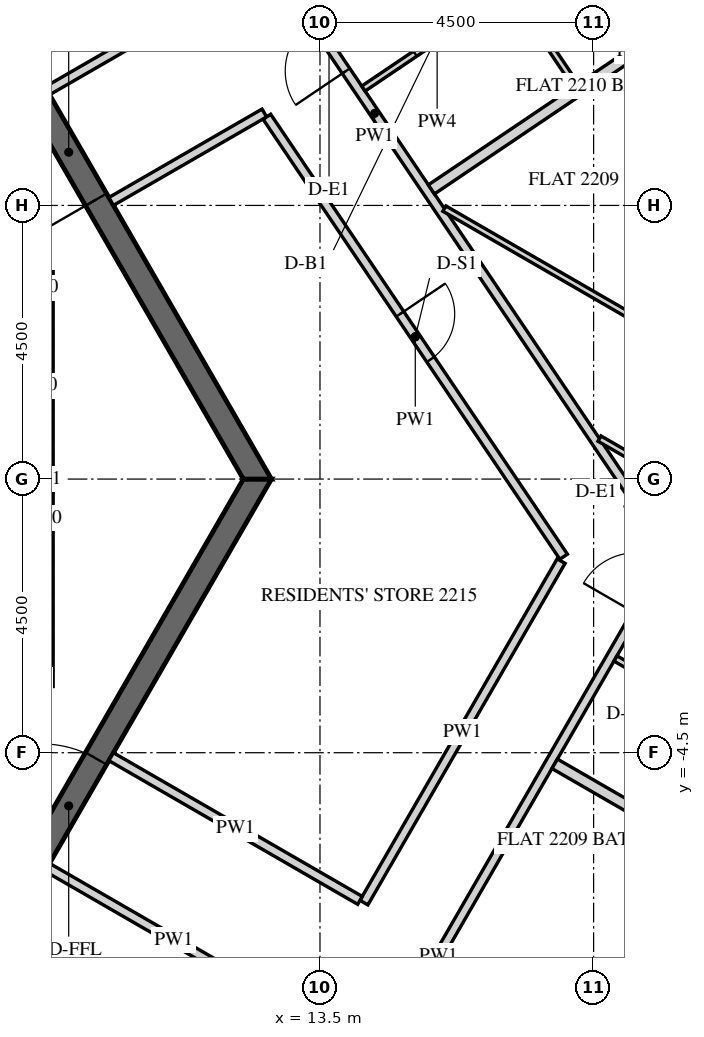
"""IFC4 building model, lengths in metres.
Left out: names, types, materials, properties, quantities, classifications, styles, units other than length and angle.
Written with IfcOpenShell. Run it as: python <this file> out.ifc"""

import sys

from ifc_helpers import new_model, si_unit, direction, frame, frame_2d, origin, place, context, subcontext, project, spatial, polyline, rectangle, outline, extrude, element, fill, save


model = new_model("IFC4")
c1 = context("Model", 3, precision=1e-05, world=origin(), true_north=direction((0.0, 1.0)))
c2 = subcontext(c1, "Body", "Model", "MODEL_VIEW")
j1 = project(units=[si_unit("LENGTHUNIT", "METRE"), si_unit("PLANEANGLEUNIT", "RADIAN")], contexts=[c1])
p1 = place(None, origin())
s1 = spatial("IfcSite", under=j1, at=p1, CompositionType="ELEMENT")
p2 = place(p1, origin())
s2 = spatial("IfcBuilding", under=s1, at=p2, CompositionType="ELEMENT")
p3 = place(p2, frame((0.0, 0.0, 279.6)))
s3 = spatial("IfcBuildingStorey", under=s2, at=p3, CompositionType="ELEMENT", Elevation=279.6)
p4 = place(p3, frame((16.451, -23.005, -0.15), z_axis=(0.0, 0.0, 1.0), x_axis=(0.500003737743, 0.866023245787, 0.0)))
e1 = element("IfcWall", 1, at=p4, inside=s3, PredefinedType="SOLIDWALL", context=c2, shape_type="SweptSolid", body=[
    extrude(outline(polyline([(-0.021, -0.25), (25.468, -0.25), (25.421, 0.25), (0.021, 0.25), (-0.021, -0.25)])), origin(), (0.0, 0.0, 1.0), 3.9),
])
p5 = place(p4, frame((2.522, 0.0, 0.75)))
e2 = element("IfcOpeningElement", 2, at=p5, cuts=e1, PredefinedType="OPENING", context=c2, shape_type="SweptSolid", body=[
    extrude(rectangle(XDim=2.4, YDim=2.7, at=frame_2d((1.2, 1.35))), frame((0.0, 0.26, 0.0), z_axis=(0.0, -1.0, 0.0), x_axis=(1.0, 0.0, 0.0)), (0.0, 0.0, 1.0), 0.52),
])
p6 = place(p4, frame((6.122, 0.0, 0.75)))
e3 = element("IfcOpeningElement", 3, at=p6, cuts=e1, PredefinedType="OPENING", context=c2, shape_type="SweptSolid", body=[
    extrude(rectangle(XDim=2.4, YDim=2.7, at=frame_2d((1.2, 1.35))), frame((0.0, 0.26, 0.0), z_axis=(0.0, -1.0, 0.0), x_axis=(1.0, 0.0, 0.0)), (0.0, 0.0, 1.0), 0.52),
])
p7 = place(p4, frame((9.722, 0.0, 0.75)))
e4 = element("IfcOpeningElement", 4, at=p7, cuts=e1, PredefinedType="OPENING", context=c2, shape_type="SweptSolid", body=[
    extrude(rectangle(XDim=2.4, YDim=2.7, at=frame_2d((1.2, 1.35))), frame((0.0, 0.26, 0.0), z_axis=(0.0, -1.0, 0.0), x_axis=(1.0, 0.0, 0.0)), (0.0, 0.0, 1.0), 0.52),
])
p8 = place(p4, frame((13.323, 0.0, 0.75)))
e5 = element("IfcOpeningElement", 5, at=p8, cuts=e1, PredefinedType="OPENING", context=c2, shape_type="SweptSolid", body=[
    extrude(rectangle(XDim=2.4, YDim=2.7, at=frame_2d((1.2, 1.35))), frame((0.0, 0.26, 0.0), z_axis=(0.0, -1.0, 0.0), x_axis=(1.0, 0.0, 0.0)), (0.0, 0.0, 1.0), 0.52),
])
p9 = place(p4, frame((16.922, 0.0, 0.75)))
e6 = element("IfcOpeningElement", 6, at=p9, cuts=e1, PredefinedType="OPENING", context=c2, shape_type="SweptSolid", body=[
    extrude(rectangle(XDim=2.4, YDim=2.7, at=frame_2d((1.2, 1.35))), frame((0.0, 0.26, 0.0), z_axis=(0.0, -1.0, 0.0), x_axis=(1.0, 0.0, 0.0)), (0.0, 0.0, 1.0), 0.52),
])
p10 = place(p4, frame((20.522, 0.0, 0.75)))
e7 = element("IfcOpeningElement", 7, at=p10, cuts=e1, PredefinedType="OPENING", context=c2, shape_type="SweptSolid", body=[
    extrude(rectangle(XDim=2.4, YDim=2.7, at=frame_2d((1.2, 1.35))), frame((0.0, 0.26, 0.0), z_axis=(0.0, -1.0, 0.0), x_axis=(1.0, 0.0, 0.0)), (0.0, 0.0, 1.0), 0.52),
])
p11 = place(p3, frame((26.706, 2.879, -0.15), z_axis=(0.0, 0.0, 1.0), x_axis=(-0.559197891507, 0.829034208061, 0.0)))
e8 = element("IfcWall", 8, at=p11, inside=s3, PredefinedType="SOLIDWALL", context=c2, shape_type="SweptSolid", body=[
    extrude(outline(polyline([(0.25, -0.25), (22.795, -0.25), (23.295, 0.25), (-0.25, 0.25), (0.25, -0.25)])), origin(), (0.0, 0.0, 1.0), 3.9),
])
p12 = place(p11, frame((1.323, 0.0, 1.05)))
e9 = element("IfcOpeningElement", 9, at=p12, cuts=e8, PredefinedType="OPENING", context=c2, shape_type="SweptSolid", body=[
    extrude(rectangle(XDim=0.9, YDim=1.5, at=frame_2d((0.45, 0.75))), frame((0.0, 0.26, 0.0), z_axis=(0.0, -1.0, 0.0), x_axis=(1.0, 0.0, 0.0)), (0.0, 0.0, 1.0), 0.52),
])
p13 = place(p11, frame((2.522, 0.0, 0.15)))
e10 = element("IfcOpeningElement", 10, at=p13, cuts=e8, PredefinedType="OPENING", context=c2, shape_type="SweptSolid", body=[
    extrude(rectangle(XDim=1.2, YDim=2.4, at=frame_2d((0.6, 1.2))), frame((0.0, 0.26, 0.0), z_axis=(0.0, -1.0, 0.0), x_axis=(1.0, 0.0, 0.0)), (0.0, 0.0, 1.0), 0.52),
])
p14 = place(p11, frame((4.922, 0.0, 1.05)))
e11 = element("IfcOpeningElement", 11, at=p14, cuts=e8, PredefinedType="OPENING", context=c2, shape_type="SweptSolid", body=[
    extrude(rectangle(XDim=0.9, YDim=1.5, at=frame_2d((0.45, 0.75))), frame((0.0, 0.26, 0.0), z_axis=(0.0, -1.0, 0.0), x_axis=(1.0, 0.0, 0.0)), (0.0, 0.0, 1.0), 0.52),
])
p15 = place(p11, frame((6.122, 0.0, 0.15)))
e12 = element("IfcOpeningElement", 12, at=p15, cuts=e8, PredefinedType="OPENING", context=c2, shape_type="SweptSolid", body=[
    extrude(rectangle(XDim=1.2, YDim=2.4, at=frame_2d((0.6, 1.2))), frame((0.0, 0.26, 0.0), z_axis=(0.0, -1.0, 0.0), x_axis=(1.0, 0.0, 0.0)), (0.0, 0.0, 1.0), 0.52),
])
p16 = place(p11, frame((8.522, 0.0, 1.05)))
e13 = element("IfcOpeningElement", 13, at=p16, cuts=e8, PredefinedType="OPENING", context=c2, shape_type="SweptSolid", body=[
    extrude(rectangle(XDim=0.9, YDim=1.5, at=frame_2d((0.45, 0.75))), frame((0.0, 0.26, 0.0), z_axis=(0.0, -1.0, 0.0), x_axis=(1.0, 0.0, 0.0)), (0.0, 0.0, 1.0), 0.52),
])
p17 = place(p11, frame((9.722, 0.0, 0.15)))
e14 = element("IfcOpeningElement", 14, at=p17, cuts=e8, PredefinedType="OPENING", context=c2, shape_type="SweptSolid", body=[
    extrude(rectangle(XDim=1.2, YDim=2.4, at=frame_2d((0.6, 1.2))), frame((0.0, 0.26, 0.0), z_axis=(0.0, -1.0, 0.0), x_axis=(1.0, 0.0, 0.0)), (0.0, 0.0, 1.0), 0.52),
])
p18 = place(p11, frame((12.122, 0.0, 1.05)))
e15 = element("IfcOpeningElement", 15, at=p18, cuts=e8, PredefinedType="OPENING", context=c2, shape_type="SweptSolid", body=[
    extrude(rectangle(XDim=0.9, YDim=1.5, at=frame_2d((0.45, 0.75))), frame((0.0, 0.26, 0.0), z_axis=(0.0, -1.0, 0.0), x_axis=(1.0, 0.0, 0.0)), (0.0, 0.0, 1.0), 0.52),
])
p19 = place(p11, frame((13.323, 0.0, 0.15)))
e16 = element("IfcOpeningElement", 16, at=p19, cuts=e8, PredefinedType="OPENING", context=c2, shape_type="SweptSolid", body=[
    extrude(rectangle(XDim=1.2, YDim=2.4, at=frame_2d((0.6, 1.2))), frame((0.0, 0.26, 0.0), z_axis=(0.0, -1.0, 0.0), x_axis=(1.0, 0.0, 0.0)), (0.0, 0.0, 1.0), 0.52),
])
p20 = place(p11, frame((15.722, 0.0, 1.05)))
e17 = element("IfcOpeningElement", 17, at=p20, cuts=e8, PredefinedType="OPENING", context=c2, shape_type="SweptSolid", body=[
    extrude(rectangle(XDim=0.9, YDim=1.5, at=frame_2d((0.45, 0.75))), frame((0.0, 0.26, 0.0), z_axis=(0.0, -1.0, 0.0), x_axis=(1.0, 0.0, 0.0)), (0.0, 0.0, 1.0), 0.52),
])
p21 = place(p11, frame((16.922, 0.0, 0.15)))
e18 = element("IfcOpeningElement", 18, at=p21, cuts=e8, PredefinedType="OPENING", context=c2, shape_type="SweptSolid", body=[
    extrude(rectangle(XDim=1.2, YDim=2.4, at=frame_2d((0.6, 1.2))), frame((0.0, 0.26, 0.0), z_axis=(0.0, -1.0, 0.0), x_axis=(1.0, 0.0, 0.0)), (0.0, 0.0, 1.0), 0.52),
])
p22 = place(p11, frame((19.323, 0.0, 1.05)))
e19 = element("IfcOpeningElement", 19, at=p22, cuts=e8, PredefinedType="OPENING", context=c2, shape_type="SweptSolid", body=[
    extrude(rectangle(XDim=0.9, YDim=1.5, at=frame_2d((0.45, 0.75))), frame((0.0, 0.26, 0.0), z_axis=(0.0, -1.0, 0.0), x_axis=(1.0, 0.0, 0.0)), (0.0, 0.0, 1.0), 0.52),
])
p23 = place(p11, frame((20.522, 0.0, 0.15)))
e20 = element("IfcOpeningElement", 20, at=p23, cuts=e8, PredefinedType="OPENING", context=c2, shape_type="SweptSolid", body=[
    extrude(rectangle(XDim=1.2, YDim=2.4, at=frame_2d((0.6, 1.2))), frame((0.0, 0.26, 0.0), z_axis=(0.0, -1.0, 0.0), x_axis=(1.0, 0.0, 0.0)), (0.0, 0.0, 1.0), 0.52),
])
p24 = place(p3, frame((6.235, -10.8, -0.15), z_axis=(0.0, 0.0, 1.0), x_axis=(0.499996419489, 0.866027470984, 0.0)))
e21 = element("IfcWall", 21, at=p24, inside=s3, PredefinedType="SHEAR", context=c2, shape_type="SweptSolid", body=[
    extrude(outline(polyline([(-0.115, -0.2), (12.586, -0.2), (12.355, 0.2), (0.115, 0.2), (-0.115, -0.2)])), origin(), (0.0, 0.0, 1.0), 3.9),
])
p25 = place(p24, frame((5.364, 0.0, 0.15)))
e22 = element("IfcOpeningElement", 22, at=p25, cuts=e21, PredefinedType="OPENING", context=c2, shape_type="SweptSolid", body=[
    extrude(rectangle(XDim=1.8, YDim=2.4, at=frame_2d((0.9, 1.2))), frame((0.0, 0.21, 0.0), z_axis=(0.0, -1.0, 0.0), x_axis=(1.0, 0.0, 0.0)), (0.0, 0.0, 1.0), 0.42),
])
p26 = place(p3, frame((12.471, 0.0, -0.15), z_axis=(0.0, 0.0, 1.0), x_axis=(-0.499996419489, 0.866027470984, 0.0)))
e23 = element("IfcWall", 23, at=p26, inside=s3, PredefinedType="SHEAR", context=c2, shape_type="SweptSolid", body=[
    extrude(outline(polyline([(-0.115, -0.2), (12.586, -0.2), (12.355, 0.2), (0.115, 0.2), (-0.115, -0.2)])), origin(), (0.0, 0.0, 1.0), 3.9),
])
p27 = place(p26, frame((5.306, 0.0, 0.15)))
e24 = element("IfcOpeningElement", 24, at=p27, cuts=e23, PredefinedType="OPENING", context=c2, shape_type="SweptSolid", body=[
    extrude(rectangle(XDim=1.8, YDim=2.4, at=frame_2d((0.9, 1.2))), frame((0.0, 0.21, 0.0), z_axis=(0.0, -1.0, 0.0), x_axis=(1.0, 0.0, 0.0)), (0.0, 0.0, 1.0), 0.42),
])
p28 = place(p3, frame((11.627, -14.462, 0.0), z_axis=(0.0, 0.0, 1.0), x_axis=(0.499994634027, 0.866028501808, 0.0)))
e25 = element("IfcWall", 25, at=p28, inside=s3, PredefinedType="PARTITIONING", context=c2, shape_type="SweptSolid", body=[
    extrude(rectangle(XDim=15.296, YDim=0.15, at=frame_2d((7.648, 0.0))), origin(), (0.0, 0.0, 1.0), 2.988),
])
p29 = place(p28, frame((0.525, 0.0, 0.0)))
e26 = element("IfcOpeningElement", 26, at=p29, cuts=e25, PredefinedType="OPENING", context=c2, shape_type="SweptSolid", body=[
    extrude(rectangle(XDim=1.0, YDim=2.1, at=frame_2d((0.5, 1.05))), frame((0.0, 0.085, 0.0), z_axis=(0.0, -1.0, 0.0), x_axis=(1.0, 0.0, 0.0)), (0.0, 0.0, 1.0), 0.17),
])
p30 = place(p28, frame((14.146, 0.0, 0.0)))
e27 = element("IfcOpeningElement", 27, at=p30, cuts=e25, PredefinedType="OPENING", context=c2, shape_type="SweptSolid", body=[
    extrude(rectangle(XDim=1.0, YDim=2.1, at=frame_2d((0.5, 1.05))), frame((0.0, 0.085, 0.0), z_axis=(0.0, -1.0, 0.0), x_axis=(1.0, 0.0, 0.0)), (0.0, 0.0, 1.0), 0.17),
])
p31 = place(p3, frame((19.228, -1.146, 0.0), z_axis=(0.0, 0.0, 1.0), x_axis=(-0.559173750718, 0.829050490928, 0.0)))
e28 = element("IfcWall", 28, at=p31, inside=s3, PredefinedType="PARTITIONING", context=c2, shape_type="SweptSolid", body=[
    extrude(rectangle(XDim=17.273, YDim=0.15, at=frame_2d((8.637, 0.0))), origin(), (0.0, 0.0, 1.0), 2.988),
])
p32 = place(p31, frame((9.478, 0.0, 0.0)))
e29 = element("IfcOpeningElement", 29, at=p32, cuts=e28, PredefinedType="OPENING", context=c2, shape_type="SweptSolid", body=[
    extrude(rectangle(XDim=1.0, YDim=2.1, at=frame_2d((0.5, 1.05))), frame((0.0, 0.085, 0.0), z_axis=(0.0, -1.0, 0.0), x_axis=(1.0, 0.0, 0.0)), (0.0, 0.0, 1.0), 0.17),
])
p33 = place(p3, frame((10.066, 4.566, 0.0), z_axis=(0.0, 0.0, 1.0), x_axis=(0.866034661658, 0.49998396455, 0.0)))
e30 = element("IfcWall", 30, at=p33, inside=s3, PredefinedType="PARTITIONING", context=c2, shape_type="SweptSolid", body=[
    extrude(rectangle(XDim=2.909, YDim=0.15, at=frame_2d((1.455, 0.0))), origin(), (0.0, 0.0, 1.0), 2.988),
])
p34 = place(p3, frame((12.627, 5.958, 0.0), z_axis=(0.0, 0.0, 1.0), x_axis=(0.559185493191, -0.829042570804, 0.0)))
e31 = element("IfcWall", 31, at=p34, inside=s3, PredefinedType="PARTITIONING", context=c2, shape_type="SweptSolid", body=[
    extrude(rectangle(XDim=8.727, YDim=0.15, at=frame_2d((4.363, 0.0))), origin(), (0.0, 0.0, 1.0), 2.988),
])
p35 = place(p34, frame((3.913, 0.0, 0.0)))
e32 = element("IfcOpeningElement", 32, at=p35, cuts=e31, PredefinedType="OPENING", context=c2, shape_type="SweptSolid", body=[
    extrude(rectangle(XDim=0.9, YDim=2.1, at=frame_2d((0.45, 1.05))), frame((0.0, 0.085, 0.0), z_axis=(0.0, -1.0, 0.0), x_axis=(1.0, 0.0, 0.0)), (0.0, 0.0, 1.0), 0.17),
])
p36 = place(p3, frame((17.465, -1.349, 0.0), z_axis=(0.0, 0.0, 1.0), x_axis=(-0.500001610943, -0.866024473704, 0.0)))
e33 = element("IfcWall", 33, at=p36, inside=s3, PredefinedType="PARTITIONING", context=c2, shape_type="SweptSolid", body=[
    extrude(rectangle(XDim=6.485, YDim=0.15, at=frame_2d((3.243, 0.0))), origin(), (0.0, 0.0, 1.0), 2.988),
])
p37 = place(p3, frame((14.158, -6.928, 0.0), z_axis=(0.0, 0.0, 1.0), x_axis=(-0.866024684746, 0.500001245408, 0.0)))
e34 = element("IfcWall", 34, at=p37, inside=s3, PredefinedType="PARTITIONING", context=c2, shape_type="SweptSolid", body=[
    extrude(rectangle(XDim=4.725, YDim=0.15, at=frame_2d((2.363, 0.0))), origin(), (0.0, 0.0, 1.0), 2.988),
])
p38 = place(p3, frame((9.016, -6.384, 0.0), z_axis=(0.0, 0.0, 1.0), x_axis=(0.866015339567, -0.500017431331, 0.0)))
e35 = element("IfcWall", 35, at=p38, inside=s3, PredefinedType="PARTITIONING", context=c2, shape_type="SweptSolid", body=[
    extrude(rectangle(XDim=4.8, YDim=0.15, at=frame_2d((2.4, 0.0))), origin(), (0.0, 0.0, 1.0), 2.988),
])
p39 = place(p3, frame((11.343, 7.728, 0.0), z_axis=(0.0, 0.0, 1.0), x_axis=(-0.866037314867, -0.499979368833, 0.0)))
e36 = element("IfcWall", 36, at=p39, inside=s3, PredefinedType="PARTITIONING", context=c2, shape_type="SweptSolid", body=[
    extrude(rectangle(XDim=2.687, YDim=0.15, at=frame_2d((1.344, 0.0))), origin(), (0.0, 0.0, 1.0), 2.988),
])
p40 = place(p3, frame((24.396, -8.745, 0.0), z_axis=(0.0, 0.0, 1.0), x_axis=(-0.866022959057, 0.500004234368, 0.0)))
e37 = element("IfcWall", 37, at=p40, inside=s3, PredefinedType="PARTITIONING", context=c2, shape_type="SweptSolid", body=[
    extrude(rectangle(XDim=8.125, YDim=0.18, at=frame_2d((4.062, 0.0))), origin(), (0.0, 0.0, 1.0), 2.988),
])
p41 = place(p3, frame((15.545, 4.448, 0.0), z_axis=(0.0, 0.0, 1.0), x_axis=(0.866022320763, -0.500005339912, 0.0)))
e38 = element("IfcWall", 38, at=p41, inside=s3, PredefinedType="PARTITIONING", context=c2, shape_type="SweptSolid", body=[
    extrude(rectangle(XDim=9.861, YDim=0.1, at=frame_2d((4.931, 0.0))), origin(), (0.0, 0.0, 1.0), 2.988),
])
p42 = place(p3, frame((22.069, 9.307, 0.0), z_axis=(0.0, 0.0, 1.0), x_axis=(-0.829042649773, -0.559185376111, 0.0)))
e39 = element("IfcWall", 39, at=p42, inside=s3, PredefinedType="PARTITIONING", context=c2, shape_type="SweptSolid", body=[
    extrude(rectangle(XDim=8.125, YDim=0.18, at=frame_2d((4.062, 0.0))), origin(), (0.0, 0.0, 1.0), 2.988),
])
p43 = place(p3, frame((18.36, -2.95, 0.0), z_axis=(0.0, 0.0, 1.0), x_axis=(0.866012039196, -0.500023147432, 0.0)))
e40 = element("IfcWall", 40, at=p43, inside=s3, PredefinedType="PARTITIONING", context=c2, shape_type="SweptSolid", body=[
    extrude(rectangle(XDim=3.725, YDim=0.1, at=frame_2d((1.862, 0.0))), origin(), (0.0, 0.0, 1.0), 2.988),
])
p44 = place(p43, frame((1.425, 0.0, 0.0)))
e41 = element("IfcOpeningElement", 41, at=p44, cuts=e40, PredefinedType="OPENING", context=c2, shape_type="SweptSolid", body=[
    extrude(rectangle(XDim=0.8, YDim=2.1, at=frame_2d((0.4, 1.05))), frame((0.0, 0.06, 0.0), z_axis=(0.0, -1.0, 0.0), x_axis=(1.0, 0.0, 0.0)), (0.0, 0.0, 1.0), 0.12),
])
p45 = place(p3, frame((23.085, -2.215, 0.0), z_axis=(0.0, 0.0, 1.0), x_axis=(-0.866017611601, 0.500013496215, 0.0)))
e42 = element("IfcWall", 42, at=p45, inside=s3, PredefinedType="PARTITIONING", context=c2, shape_type="SweptSolid", body=[
    extrude(rectangle(XDim=5.76, YDim=0.1, at=frame_2d((2.88, 0.0))), origin(), (0.0, 0.0, 1.0), 2.988),
])
p46 = place(p45, frame((1.5, 0.0, 0.0)))
e43 = element("IfcOpeningElement", 43, at=p46, cuts=e42, PredefinedType="OPENING", context=c2, shape_type="SweptSolid", body=[
    extrude(rectangle(XDim=0.8, YDim=2.1, at=frame_2d((0.4, 1.05))), frame((0.0, 0.06, 0.0), z_axis=(0.0, -1.0, 0.0), x_axis=(1.0, 0.0, 0.0)), (0.0, 0.0, 1.0), 0.12),
])
p47 = place(p3, frame((14.214, 6.422, 0.0), z_axis=(0.0, 0.0, 1.0), x_axis=(0.829072128826, 0.559141668278, 0.0)))
e44 = element("IfcWall", 44, at=p47, inside=s3, PredefinedType="PARTITIONING", context=c2, shape_type="SweptSolid", body=[
    extrude(rectangle(XDim=2.925, YDim=0.1, at=frame_2d((1.462, 0.0))), origin(), (0.0, 0.0, 1.0), 2.988),
])
p48 = place(p47, frame((1.025, 0.0, 0.0)))
e45 = element("IfcOpeningElement", 45, at=p48, cuts=e44, PredefinedType="OPENING", context=c2, shape_type="SweptSolid", body=[
    extrude(rectangle(XDim=0.8, YDim=2.1, at=frame_2d((0.4, 1.05))), frame((0.0, 0.06, 0.0), z_axis=(0.0, -1.0, 0.0), x_axis=(1.0, 0.0, 0.0)), (0.0, 0.0, 1.0), 0.12),
])
p49 = place(p3, frame((17.707, 6.474, 0.0), z_axis=(0.0, 0.0, 1.0), x_axis=(-0.559261140113, 0.828991542273, 0.0)))
e46 = element("IfcWall", 46, at=p49, inside=s3, PredefinedType="PARTITIONING", context=c2, shape_type="SweptSolid", body=[
    extrude(rectangle(XDim=1.862, YDim=0.1, at=frame_2d((0.931, 0.0))), origin(), (0.0, 0.0, 1.0), 2.988),
])
p50 = place(p27, origin())
e47 = element("IfcDoor", 47, at=p50, inside=s3, OperationType="DOUBLE_DOOR_SINGLE_SWING", PredefinedType="DOOR", context=c2, shape_type="SweptSolid", body=[
    extrude(rectangle(XDim=1.8, YDim=2.4, at=frame_2d((0.9, 1.2))), frame((0.0, 0.025, 0.0), z_axis=(0.0, -1.0, 0.0), x_axis=(1.0, 0.0, 0.0)), (0.0, 0.0, 1.0), 0.05),
])
fill(e24, e47)
p51 = place(p25, origin())
e48 = element("IfcDoor", 48, at=p51, inside=s3, OperationType="DOUBLE_DOOR_SINGLE_SWING", PredefinedType="DOOR", context=c2, shape_type="SweptSolid", body=[
    extrude(rectangle(XDim=1.8, YDim=2.4, at=frame_2d((0.9, 1.2))), frame((0.0, 0.025, 0.0), z_axis=(0.0, -1.0, 0.0), x_axis=(1.0, 0.0, 0.0)), (0.0, 0.0, 1.0), 0.05),
])
fill(e22, e48)
p52 = place(p32, origin())
e49 = element("IfcDoor", 49, at=p52, inside=s3, OperationType="SINGLE_SWING_LEFT", PredefinedType="DOOR", context=c2, shape_type="SweptSolid", body=[
    extrude(rectangle(XDim=1.0, YDim=2.1, at=frame_2d((0.5, 1.05))), frame((0.0, 0.025, 0.0), z_axis=(0.0, -1.0, 0.0), x_axis=(1.0, 0.0, 0.0)), (0.0, 0.0, 1.0), 0.05),
])
fill(e29, e49)
p53 = place(p48, origin())
e50 = element("IfcDoor", 50, at=p53, inside=s3, OperationType="SINGLE_SWING_RIGHT", PredefinedType="DOOR", context=c2, shape_type="SweptSolid", body=[
    extrude(rectangle(XDim=0.8, YDim=2.1, at=frame_2d((0.4, 1.05))), frame((0.0, 0.025, 0.0), z_axis=(0.0, -1.0, 0.0), x_axis=(1.0, 0.0, 0.0)), (0.0, 0.0, 1.0), 0.05),
])
fill(e45, e50)
p54 = place(p35, origin())
e51 = element("IfcDoor", 51, at=p54, inside=s3, OperationType="SINGLE_SWING_RIGHT", PredefinedType="DOOR", context=c2, shape_type="SweptSolid", body=[
    extrude(rectangle(XDim=0.9, YDim=2.1, at=frame_2d((0.45, 1.05))), frame((0.0, 0.025, 0.0), z_axis=(0.0, -1.0, 0.0), x_axis=(1.0, 0.0, 0.0)), (0.0, 0.0, 1.0), 0.05),
])
fill(e32, e51)
save(model, sys.argv[1])
